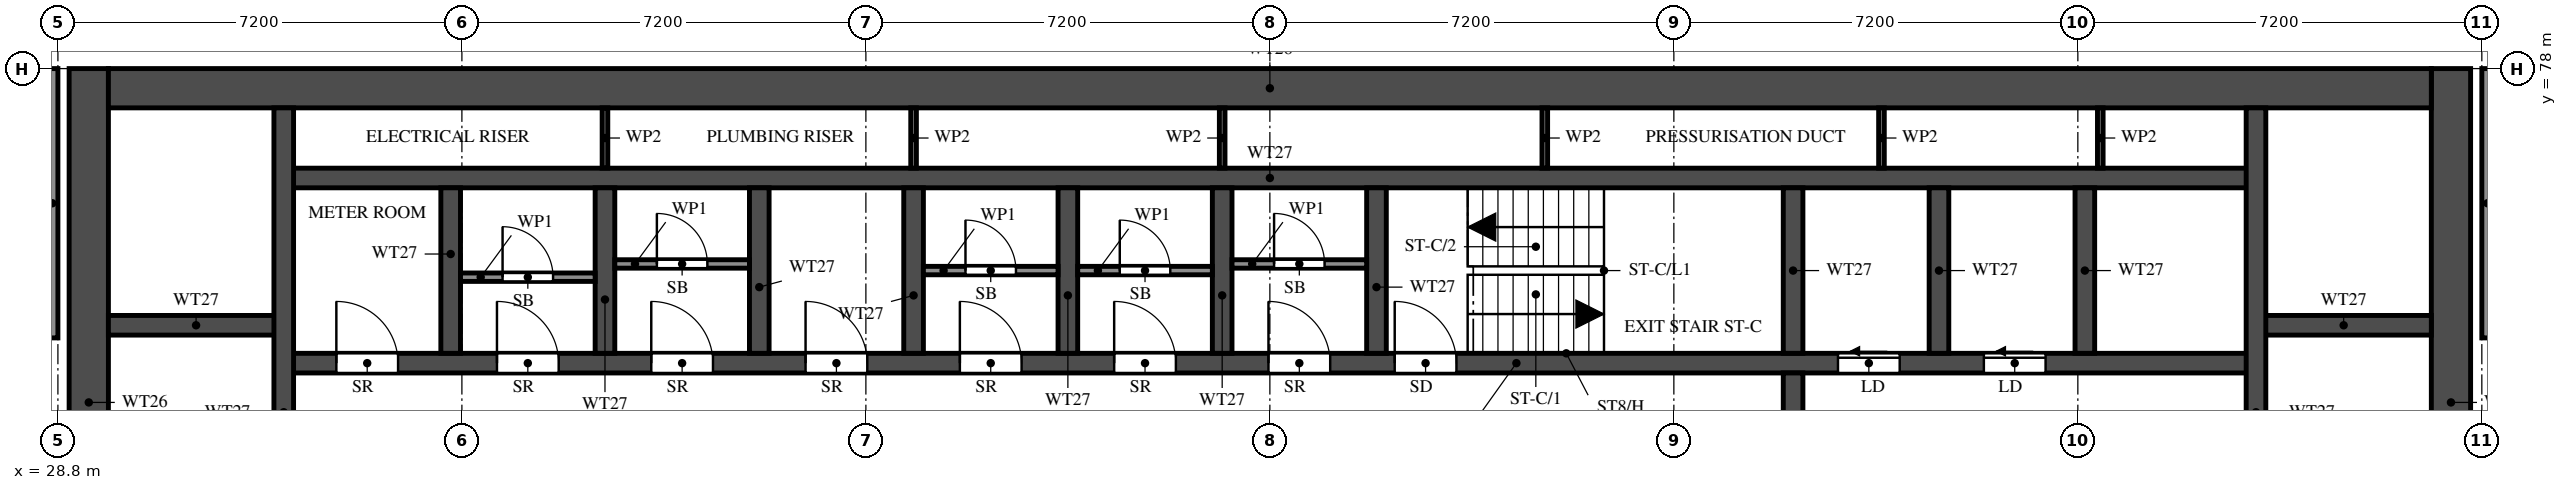
"""IFC4 building model, lengths in metres.
Left out: names, types, materials, properties, quantities, classifications, styles, units other than length and angle.
Written with IfcOpenShell. Run it as: python <this file> out.ifc"""

import sys

from ifc_helpers import new_model, si_unit, direction, frame, frame_2d, origin, place, context, subcontext, project, spatial, rectangle, extrude, element, fill, save


model = new_model("IFC4")
c1 = context("Model", 3, precision=1e-05, world=origin(), true_north=direction((0.0, 1.0)))
c2 = subcontext(c1, "Body", "Model", "MODEL_VIEW")
j1 = project(units=[si_unit("LENGTHUNIT", "METRE"), si_unit("PLANEANGLEUNIT", "RADIAN")], contexts=[c1])
p1 = place(None, origin())
s1 = spatial("IfcSite", under=j1, at=p1, CompositionType="ELEMENT")
p2 = place(p1, origin())
s2 = spatial("IfcBuilding", under=s1, at=p2, CompositionType="ELEMENT")
p3 = place(p2, frame((0.0, 0.0, 127.0)))
s3 = spatial("IfcBuildingStorey", under=s2, at=p3, CompositionType="ELEMENT", Elevation=127.0)
for number, where, z_axis, x_axis in (
    (1, (29.35, 66.1, 0.0), (0.0, 0.0, 1.0), (0.0, 1.0, 0.0)),
    (2, (71.45, 66.1, 0.0), (0.0, 0.0, 1.0), (0.0, 1.0, 0.0)),
):
    element("IfcWall", number, at=place(p3, frame(where, z_axis=z_axis, x_axis=x_axis)), inside=s3, PredefinedType="SHEAR", context=c2, shape_type="SweptSolid", body=[
        extrude(rectangle(XDim=11.9, YDim=0.7, at=frame_2d((5.95, 0.0))), origin(), (0.0, 0.0, 1.0), 3.2),
    ])
p4 = place(p3, frame((29.7, 77.65, 0.0), z_axis=(0.0, 0.0, 1.0), x_axis=(1.0, 0.0, 0.0)))
e3 = element("IfcWall", 3, at=p4, inside=s3, PredefinedType="SHEAR", context=c2, shape_type="SweptSolid", body=[
    extrude(rectangle(XDim=41.4, YDim=0.7, at=frame_2d((20.7, 0.0))), origin(), (0.0, 0.0, 1.0), 3.2),
])
p5 = place(p3, frame((32.825, 72.75, 0.0), z_axis=(0.0, 0.0, 1.0), x_axis=(1.0, 0.0, 0.0)))
e4 = element("IfcWall", 4, at=p5, inside=s3, PredefinedType="SHEAR", context=c2, shape_type="SweptSolid", body=[
    extrude(rectangle(XDim=35.15, YDim=0.35, at=frame_2d((17.575, 0.0))), origin(), (0.0, 0.0, 1.0), 3.2),
])
p6 = place(p5, frame((19.8, 0.0, 0.0)))
e5 = element("IfcOpeningElement", 5, at=p6, cuts=e4, PredefinedType="OPENING", context=c2, shape_type="SweptSolid", body=[
    extrude(rectangle(XDim=1.1, YDim=2.1, at=frame_2d((0.55, 1.05))), frame((0.0, 0.185, 0.0), z_axis=(0.0, -1.0, 0.0), x_axis=(1.0, 0.0, 0.0)), (0.0, 0.0, 1.0), 0.37),
])
p7 = place(p5, frame((27.7, 0.0, 0.0)))
e6 = element("IfcOpeningElement", 6, at=p7, cuts=e4, PredefinedType="OPENING", context=c2, shape_type="SweptSolid", body=[
    extrude(rectangle(XDim=1.1, YDim=2.1, at=frame_2d((0.55, 1.05))), frame((0.0, 0.185, 0.0), z_axis=(0.0, -1.0, 0.0), x_axis=(1.0, 0.0, 0.0)), (0.0, 0.0, 1.0), 0.37),
])
p8 = place(p5, frame((30.3, 0.0, 0.0)))
e7 = element("IfcOpeningElement", 7, at=p8, cuts=e4, PredefinedType="OPENING", context=c2, shape_type="SweptSolid", body=[
    extrude(rectangle(XDim=1.1, YDim=2.1, at=frame_2d((0.55, 1.05))), frame((0.0, 0.185, 0.0), z_axis=(0.0, -1.0, 0.0), x_axis=(1.0, 0.0, 0.0)), (0.0, 0.0, 1.0), 0.37),
])
p9 = place(p5, frame((3.8, 0.0, 0.0)))
e8 = element("IfcOpeningElement", 8, at=p9, cuts=e4, PredefinedType="OPENING", context=c2, shape_type="SweptSolid", body=[
    extrude(rectangle(XDim=1.1, YDim=2.1, at=frame_2d((0.55, 1.05))), frame((0.0, 0.185, 0.0), z_axis=(0.0, -1.0, 0.0), x_axis=(1.0, 0.0, 0.0)), (0.0, 0.0, 1.0), 0.37),
])
p10 = place(p5, frame((6.55, 0.0, 0.0)))
e9 = element("IfcOpeningElement", 9, at=p10, cuts=e4, PredefinedType="OPENING", context=c2, shape_type="SweptSolid", body=[
    extrude(rectangle(XDim=1.1, YDim=2.1, at=frame_2d((0.55, 1.05))), frame((0.0, 0.185, 0.0), z_axis=(0.0, -1.0, 0.0), x_axis=(1.0, 0.0, 0.0)), (0.0, 0.0, 1.0), 0.37),
])
p11 = place(p5, frame((9.3, 0.0, 0.0)))
e10 = element("IfcOpeningElement", 10, at=p11, cuts=e4, PredefinedType="OPENING", context=c2, shape_type="SweptSolid", body=[
    extrude(rectangle(XDim=1.1, YDim=2.1, at=frame_2d((0.55, 1.05))), frame((0.0, 0.185, 0.0), z_axis=(0.0, -1.0, 0.0), x_axis=(1.0, 0.0, 0.0)), (0.0, 0.0, 1.0), 0.37),
])
p12 = place(p5, frame((12.05, 0.0, 0.0)))
e11 = element("IfcOpeningElement", 11, at=p12, cuts=e4, PredefinedType="OPENING", context=c2, shape_type="SweptSolid", body=[
    extrude(rectangle(XDim=1.1, YDim=2.1, at=frame_2d((0.55, 1.05))), frame((0.0, 0.185, 0.0), z_axis=(0.0, -1.0, 0.0), x_axis=(1.0, 0.0, 0.0)), (0.0, 0.0, 1.0), 0.37),
])
p13 = place(p5, frame((14.8, 0.0, 0.0)))
e12 = element("IfcOpeningElement", 12, at=p13, cuts=e4, PredefinedType="OPENING", context=c2, shape_type="SweptSolid", body=[
    extrude(rectangle(XDim=1.1, YDim=2.1, at=frame_2d((0.55, 1.05))), frame((0.0, 0.185, 0.0), z_axis=(0.0, -1.0, 0.0), x_axis=(1.0, 0.0, 0.0)), (0.0, 0.0, 1.0), 0.37),
])
p14 = place(p5, frame((17.55, 0.0, 0.0)))
e13 = element("IfcOpeningElement", 13, at=p14, cuts=e4, PredefinedType="OPENING", context=c2, shape_type="SweptSolid", body=[
    extrude(rectangle(XDim=1.1, YDim=2.1, at=frame_2d((0.55, 1.05))), frame((0.0, 0.185, 0.0), z_axis=(0.0, -1.0, 0.0), x_axis=(1.0, 0.0, 0.0)), (0.0, 0.0, 1.0), 0.37),
])
p15 = place(p5, frame((0.938, 0.0, 0.0)))
e14 = element("IfcOpeningElement", 14, at=p15, cuts=e4, PredefinedType="OPENING", context=c2, shape_type="SweptSolid", body=[
    extrude(rectangle(XDim=1.1, YDim=2.1, at=frame_2d((0.55, 1.05))), frame((0.0, 0.185, 0.0), z_axis=(0.0, -1.0, 0.0), x_axis=(1.0, 0.0, 0.0)), (0.0, 0.0, 1.0), 0.37),
])
p16 = place(p3, frame((32.825, 76.05, 0.0), z_axis=(0.0, 0.0, 1.0), x_axis=(1.0, 0.0, 0.0)))
e15 = element("IfcWall", 15, at=p16, inside=s3, PredefinedType="SHEAR", context=c2, shape_type="SweptSolid", body=[
    extrude(rectangle(XDim=35.15, YDim=0.35, at=frame_2d((17.575, 0.0))), origin(), (0.0, 0.0, 1.0), 3.2),
])
for number, where, z_axis, x_axis in (
    (16, (29.7, 73.425, 0.0), (0.0, 0.0, 1.0), (1.0, 0.0, 0.0)),
    (17, (67.975, 73.425, 0.0), (0.0, 0.0, 1.0), (1.0, 0.0, 0.0)),
):
    element("IfcWall", number, at=place(p3, frame(where, z_axis=z_axis, x_axis=x_axis)), inside=s3, PredefinedType="SHEAR", context=c2, shape_type="SweptSolid", body=[
        extrude(rectangle(XDim=3.125, YDim=0.35, at=frame_2d((1.562, 0.0))), origin(), (0.0, 0.0, 1.0), 3.2),
    ])
p17 = place(p3, frame((32.825, 66.45, 0.0), z_axis=(0.0, 0.0, 1.0), x_axis=(0.0, 1.0, 0.0)))
e18 = element("IfcWall", 18, at=p17, inside=s3, PredefinedType="SHEAR", context=c2, shape_type="SweptSolid", body=[
    extrude(rectangle(XDim=10.85, YDim=0.35, at=frame_2d((5.425, 0.0))), origin(), (0.0, 0.0, 1.0), 3.2),
])
p18 = place(p3, frame((67.975, 66.45, 0.0), z_axis=(0.0, 0.0, 1.0), x_axis=(0.0, 1.0, 0.0)))
e19 = element("IfcWall", 19, at=p18, inside=s3, PredefinedType="SHEAR", context=c2, shape_type="SweptSolid", body=[
    extrude(rectangle(XDim=10.85, YDim=0.35, at=frame_2d((5.425, 0.0))), origin(), (0.0, 0.0, 1.0), 3.2),
])
p19 = place(p18, frame((0.15, 0.0, 0.0)))
e20 = element("IfcOpeningElement", 20, at=p19, cuts=e19, PredefinedType="OPENING", context=c2, shape_type="SweptSolid", body=[
    extrude(rectangle(XDim=1.1, YDim=2.1, at=frame_2d((0.55, 1.05))), frame((0.0, 0.185, 0.0), z_axis=(0.0, -1.0, 0.0), x_axis=(1.0, 0.0, 0.0)), (0.0, 0.0, 1.0), 0.37),
])
p20 = place(p3, frame((59.725, 66.45, 0.0), z_axis=(0.0, 0.0, 1.0), x_axis=(0.0, 1.0, 0.0)))
e21 = element("IfcWall", 21, at=p20, inside=s3, PredefinedType="SHEAR", context=c2, shape_type="SweptSolid", body=[
    extrude(rectangle(XDim=6.125, YDim=0.35, at=frame_2d((3.062, 0.0))), origin(), (0.0, 0.0, 1.0), 3.2),
])
p21 = place(p20, frame((3.85, 0.0, 0.0)))
e22 = element("IfcOpeningElement", 22, at=p21, cuts=e21, PredefinedType="OPENING", context=c2, shape_type="SweptSolid", body=[
    extrude(rectangle(XDim=1.2, YDim=2.1, at=frame_2d((0.6, 1.05))), frame((0.0, 0.185, 0.0), z_axis=(0.0, -1.0, 0.0), x_axis=(1.0, 0.0, 0.0)), (0.0, 0.0, 1.0), 0.37),
])
for number, where, z_axis, x_axis in (
    (23, (59.725, 72.925, 0.0), (0.0, 0.0, 1.0), (0.0, 1.0, 0.0)),
    (24, (35.8, 72.925, 0.0), (0.0, 0.0, 1.0), (0.0, 1.0, 0.0)),
    (25, (38.55, 72.925, 0.0), (0.0, 0.0, 1.0), (0.0, 1.0, 0.0)),
    (26, (41.3, 72.925, 0.0), (0.0, 0.0, 1.0), (0.0, 1.0, 0.0)),
    (27, (44.05, 72.925, 0.0), (0.0, 0.0, 1.0), (0.0, 1.0, 0.0)),
    (28, (46.8, 72.925, 0.0), (0.0, 0.0, 1.0), (0.0, 1.0, 0.0)),
    (29, (49.55, 72.925, 0.0), (0.0, 0.0, 1.0), (0.0, 1.0, 0.0)),
    (30, (52.3, 72.925, 0.0), (0.0, 0.0, 1.0), (0.0, 1.0, 0.0)),
    (31, (62.325, 72.925, 0.0), (0.0, 0.0, 1.0), (0.0, 1.0, 0.0)),
    (32, (64.925, 72.925, 0.0), (0.0, 0.0, 1.0), (0.0, 1.0, 0.0)),
):
    element("IfcWall", number, at=place(p3, frame(where, z_axis=z_axis, x_axis=x_axis)), inside=s3, PredefinedType="SHEAR", context=c2, shape_type="SweptSolid", body=[
        extrude(rectangle(XDim=2.95, YDim=0.35, at=frame_2d((1.475, 0.0))), origin(), (0.0, 0.0, 1.0), 3.2),
    ])
p22 = place(p3, frame((35.975, 74.282, 0.0), z_axis=(0.0, 0.0, 1.0), x_axis=(1.0, 0.0, 0.0)))
e33 = element("IfcWall", 33, at=p22, inside=s3, PredefinedType="PARTITIONING", context=c2, shape_type="SweptSolid", body=[
    extrude(rectangle(XDim=2.4, YDim=0.15, at=frame_2d((1.2, 0.0))), origin(), (0.0, 0.0, 1.0), 3.2),
])
p23 = place(p22, frame((0.75, 0.0, 0.0)))
e34 = element("IfcOpeningElement", 34, at=p23, cuts=e33, PredefinedType="OPENING", context=c2, shape_type="SweptSolid", body=[
    extrude(rectangle(XDim=0.9, YDim=2.1, at=frame_2d((0.45, 1.05))), frame((0.0, 0.085, 0.0), z_axis=(0.0, -1.0, 0.0), x_axis=(1.0, 0.0, 0.0)), (0.0, 0.0, 1.0), 0.17),
])
p24 = place(p3, frame((38.725, 74.518, 0.0), z_axis=(0.0, 0.0, 1.0), x_axis=(1.0, 0.0, 0.0)))
e35 = element("IfcWall", 35, at=p24, inside=s3, PredefinedType="PARTITIONING", context=c2, shape_type="SweptSolid", body=[
    extrude(rectangle(XDim=2.4, YDim=0.15, at=frame_2d((1.2, 0.0))), origin(), (0.0, 0.0, 1.0), 3.2),
])
p25 = place(p24, frame((0.75, 0.0, 0.0)))
e36 = element("IfcOpeningElement", 36, at=p25, cuts=e35, PredefinedType="OPENING", context=c2, shape_type="SweptSolid", body=[
    extrude(rectangle(XDim=0.9, YDim=2.1, at=frame_2d((0.45, 1.05))), frame((0.0, 0.085, 0.0), z_axis=(0.0, -1.0, 0.0), x_axis=(1.0, 0.0, 0.0)), (0.0, 0.0, 1.0), 0.17),
])
p26 = place(p3, frame((44.225, 74.4, 0.0), z_axis=(0.0, 0.0, 1.0), x_axis=(1.0, 0.0, 0.0)))
e37 = element("IfcWall", 37, at=p26, inside=s3, PredefinedType="PARTITIONING", context=c2, shape_type="SweptSolid", body=[
    extrude(rectangle(XDim=2.4, YDim=0.15, at=frame_2d((1.2, 0.0))), origin(), (0.0, 0.0, 1.0), 3.2),
])
p27 = place(p26, frame((0.75, 0.0, 0.0)))
e38 = element("IfcOpeningElement", 38, at=p27, cuts=e37, PredefinedType="OPENING", context=c2, shape_type="SweptSolid", body=[
    extrude(rectangle(XDim=0.9, YDim=2.1, at=frame_2d((0.45, 1.05))), frame((0.0, 0.085, 0.0), z_axis=(0.0, -1.0, 0.0), x_axis=(1.0, 0.0, 0.0)), (0.0, 0.0, 1.0), 0.17),
])
p28 = place(p3, frame((46.975, 74.4, 0.0), z_axis=(0.0, 0.0, 1.0), x_axis=(1.0, 0.0, 0.0)))
e39 = element("IfcWall", 39, at=p28, inside=s3, PredefinedType="PARTITIONING", context=c2, shape_type="SweptSolid", body=[
    extrude(rectangle(XDim=2.4, YDim=0.15, at=frame_2d((1.2, 0.0))), origin(), (0.0, 0.0, 1.0), 3.2),
])
p29 = place(p28, frame((0.75, 0.0, 0.0)))
e40 = element("IfcOpeningElement", 40, at=p29, cuts=e39, PredefinedType="OPENING", context=c2, shape_type="SweptSolid", body=[
    extrude(rectangle(XDim=0.9, YDim=2.1, at=frame_2d((0.45, 1.05))), frame((0.0, 0.085, 0.0), z_axis=(0.0, -1.0, 0.0), x_axis=(1.0, 0.0, 0.0)), (0.0, 0.0, 1.0), 0.17),
])
p30 = place(p3, frame((49.725, 74.518, 0.0), z_axis=(0.0, 0.0, 1.0), x_axis=(1.0, 0.0, 0.0)))
e41 = element("IfcWall", 41, at=p30, inside=s3, PredefinedType="PARTITIONING", context=c2, shape_type="SweptSolid", body=[
    extrude(rectangle(XDim=2.4, YDim=0.15, at=frame_2d((1.2, 0.0))), origin(), (0.0, 0.0, 1.0), 3.2),
])
p31 = place(p30, frame((0.75, 0.0, 0.0)))
e42 = element("IfcOpeningElement", 42, at=p31, cuts=e41, PredefinedType="OPENING", context=c2, shape_type="SweptSolid", body=[
    extrude(rectangle(XDim=0.9, YDim=2.1, at=frame_2d((0.45, 1.05))), frame((0.0, 0.085, 0.0), z_axis=(0.0, -1.0, 0.0), x_axis=(1.0, 0.0, 0.0)), (0.0, 0.0, 1.0), 0.17),
])
for number, where, z_axis, x_axis in (
    (43, (38.55, 76.225, 0.0), (0.0, 0.0, 1.0), (0.0, 1.0, 0.0)),
    (44, (44.05, 76.225, 0.0), (0.0, 0.0, 1.0), (0.0, 1.0, 0.0)),
    (45, (49.55, 76.225, 0.0), (0.0, 0.0, 1.0), (0.0, 1.0, 0.0)),
    (46, (55.3, 76.225, 0.0), (0.0, 0.0, 1.0), (0.0, 1.0, 0.0)),
    (47, (61.3, 76.225, 0.0), (0.0, 0.0, 1.0), (0.0, 1.0, 0.0)),
    (48, (65.2, 76.225, 0.0), (0.0, 0.0, 1.0), (0.0, 1.0, 0.0)),
):
    element("IfcWall", number, at=place(p3, frame(where, z_axis=z_axis, x_axis=x_axis)), inside=s3, PredefinedType="PARTITIONING", context=c2, shape_type="SweptSolid", body=[
        extrude(rectangle(XDim=1.075, YDim=0.1, at=frame_2d((0.538, 0.0))), origin(), (0.0, 0.0, 1.0), 3.2),
    ])
for number, where, z_axis, x_axis in (
    (49, (28.7, 73.2, 0.0), (0.0, 0.0, 1.0), (0.0, 1.0, 0.0)),
    (50, (72.1, 73.2, 0.0), (0.0, 0.0, 1.0), (0.0, 1.0, 0.0)),
):
    element("IfcWall", number, at=place(p3, frame(where, z_axis=z_axis, x_axis=x_axis)), inside=s3, PredefinedType="SOLIDWALL", context=c2, shape_type="SweptSolid", body=[
        extrude(rectangle(XDim=4.8, YDim=0.2, at=frame_2d((2.4, 0.0))), origin(), (0.0, 0.0, 1.0), 3.2),
    ])
p32 = place(p6, origin())
e51 = element("IfcDoor", 51, at=p32, inside=s3, OperationType="SINGLE_SWING_LEFT", PredefinedType="DOOR", context=c2, shape_type="SweptSolid", body=[
    extrude(rectangle(XDim=1.1, YDim=2.1, at=frame_2d((0.55, 1.05))), frame((0.0, 0.025, 0.0), z_axis=(0.0, -1.0, 0.0), x_axis=(1.0, 0.0, 0.0)), (0.0, 0.0, 1.0), 0.05),
])
fill(e5, e51)
p33 = place(p7, origin())
e52 = element("IfcDoor", 52, at=p33, inside=s3, OperationType="SLIDING_TO_LEFT", PredefinedType="DOOR", context=c2, shape_type="SweptSolid", body=[
    extrude(rectangle(XDim=1.1, YDim=2.1, at=frame_2d((0.55, 1.05))), frame((0.0, 0.025, 0.0), z_axis=(0.0, -1.0, 0.0), x_axis=(1.0, 0.0, 0.0)), (0.0, 0.0, 1.0), 0.05),
])
fill(e6, e52)
p34 = place(p8, origin())
e53 = element("IfcDoor", 53, at=p34, inside=s3, OperationType="SLIDING_TO_LEFT", PredefinedType="DOOR", context=c2, shape_type="SweptSolid", body=[
    extrude(rectangle(XDim=1.1, YDim=2.1, at=frame_2d((0.55, 1.05))), frame((0.0, 0.025, 0.0), z_axis=(0.0, -1.0, 0.0), x_axis=(1.0, 0.0, 0.0)), (0.0, 0.0, 1.0), 0.05),
])
fill(e7, e53)
p35 = place(p9, origin())
e54 = element("IfcDoor", 54, at=p35, inside=s3, OperationType="SINGLE_SWING_LEFT", PredefinedType="DOOR", context=c2, shape_type="SweptSolid", body=[
    extrude(rectangle(XDim=1.1, YDim=2.1, at=frame_2d((0.55, 1.05))), frame((0.0, 0.025, 0.0), z_axis=(0.0, -1.0, 0.0), x_axis=(1.0, 0.0, 0.0)), (0.0, 0.0, 1.0), 0.05),
])
fill(e8, e54)
p36 = place(p23, origin())
e55 = element("IfcDoor", 55, at=p36, inside=s3, OperationType="SINGLE_SWING_LEFT", PredefinedType="DOOR", context=c2, shape_type="SweptSolid", body=[
    extrude(rectangle(XDim=0.9, YDim=2.1, at=frame_2d((0.45, 1.05))), frame((0.0, 0.025, 0.0), z_axis=(0.0, -1.0, 0.0), x_axis=(1.0, 0.0, 0.0)), (0.0, 0.0, 1.0), 0.05),
])
fill(e34, e55)
p37 = place(p10, origin())
e56 = element("IfcDoor", 56, at=p37, inside=s3, OperationType="SINGLE_SWING_RIGHT", PredefinedType="DOOR", context=c2, shape_type="SweptSolid", body=[
    extrude(rectangle(XDim=1.1, YDim=2.1, at=frame_2d((0.55, 1.05))), frame((0.0, 0.025, 0.0), z_axis=(0.0, -1.0, 0.0), x_axis=(1.0, 0.0, 0.0)), (0.0, 0.0, 1.0), 0.05),
])
fill(e9, e56)
p38 = place(p25, origin())
e57 = element("IfcDoor", 57, at=p38, inside=s3, OperationType="SINGLE_SWING_LEFT", PredefinedType="DOOR", context=c2, shape_type="SweptSolid", body=[
    extrude(rectangle(XDim=0.9, YDim=2.1, at=frame_2d((0.45, 1.05))), frame((0.0, 0.025, 0.0), z_axis=(0.0, -1.0, 0.0), x_axis=(1.0, 0.0, 0.0)), (0.0, 0.0, 1.0), 0.05),
])
fill(e36, e57)
p39 = place(p11, origin())
e58 = element("IfcDoor", 58, at=p39, inside=s3, OperationType="SINGLE_SWING_LEFT", PredefinedType="DOOR", context=c2, shape_type="SweptSolid", body=[
    extrude(rectangle(XDim=1.1, YDim=2.1, at=frame_2d((0.55, 1.05))), frame((0.0, 0.025, 0.0), z_axis=(0.0, -1.0, 0.0), x_axis=(1.0, 0.0, 0.0)), (0.0, 0.0, 1.0), 0.05),
])
fill(e10, e58)
p40 = place(p12, origin())
e59 = element("IfcDoor", 59, at=p40, inside=s3, OperationType="SINGLE_SWING_RIGHT", PredefinedType="DOOR", context=c2, shape_type="SweptSolid", body=[
    extrude(rectangle(XDim=1.1, YDim=2.1, at=frame_2d((0.55, 1.05))), frame((0.0, 0.025, 0.0), z_axis=(0.0, -1.0, 0.0), x_axis=(1.0, 0.0, 0.0)), (0.0, 0.0, 1.0), 0.05),
])
fill(e11, e59)
p41 = place(p27, origin())
e60 = element("IfcDoor", 60, at=p41, inside=s3, OperationType="SINGLE_SWING_RIGHT", PredefinedType="DOOR", context=c2, shape_type="SweptSolid", body=[
    extrude(rectangle(XDim=0.9, YDim=2.1, at=frame_2d((0.45, 1.05))), frame((0.0, 0.025, 0.0), z_axis=(0.0, -1.0, 0.0), x_axis=(1.0, 0.0, 0.0)), (0.0, 0.0, 1.0), 0.05),
])
fill(e38, e60)
p42 = place(p13, origin())
e61 = element("IfcDoor", 61, at=p42, inside=s3, OperationType="SINGLE_SWING_LEFT", PredefinedType="DOOR", context=c2, shape_type="SweptSolid", body=[
    extrude(rectangle(XDim=1.1, YDim=2.1, at=frame_2d((0.55, 1.05))), frame((0.0, 0.025, 0.0), z_axis=(0.0, -1.0, 0.0), x_axis=(1.0, 0.0, 0.0)), (0.0, 0.0, 1.0), 0.05),
])
fill(e12, e61)
p43 = place(p29, origin())
e62 = element("IfcDoor", 62, at=p43, inside=s3, OperationType="SINGLE_SWING_LEFT", PredefinedType="DOOR", context=c2, shape_type="SweptSolid", body=[
    extrude(rectangle(XDim=0.9, YDim=2.1, at=frame_2d((0.45, 1.05))), frame((0.0, 0.025, 0.0), z_axis=(0.0, -1.0, 0.0), x_axis=(1.0, 0.0, 0.0)), (0.0, 0.0, 1.0), 0.05),
])
fill(e40, e62)
p44 = place(p14, origin())
e63 = element("IfcDoor", 63, at=p44, inside=s3, OperationType="SINGLE_SWING_RIGHT", PredefinedType="DOOR", context=c2, shape_type="SweptSolid", body=[
    extrude(rectangle(XDim=1.1, YDim=2.1, at=frame_2d((0.55, 1.05))), frame((0.0, 0.025, 0.0), z_axis=(0.0, -1.0, 0.0), x_axis=(1.0, 0.0, 0.0)), (0.0, 0.0, 1.0), 0.05),
])
fill(e13, e63)
p45 = place(p31, origin())
e64 = element("IfcDoor", 64, at=p45, inside=s3, OperationType="SINGLE_SWING_LEFT", PredefinedType="DOOR", context=c2, shape_type="SweptSolid", body=[
    extrude(rectangle(XDim=0.9, YDim=2.1, at=frame_2d((0.45, 1.05))), frame((0.0, 0.025, 0.0), z_axis=(0.0, -1.0, 0.0), x_axis=(1.0, 0.0, 0.0)), (0.0, 0.0, 1.0), 0.05),
])
fill(e42, e64)
p46 = place(p15, origin())
e65 = element("IfcDoor", 65, at=p46, inside=s3, OperationType="SINGLE_SWING_LEFT", PredefinedType="DOOR", context=c2, shape_type="SweptSolid", body=[
    extrude(rectangle(XDim=1.1, YDim=2.1, at=frame_2d((0.55, 1.05))), frame((0.0, 0.025, 0.0), z_axis=(0.0, -1.0, 0.0), x_axis=(1.0, 0.0, 0.0)), (0.0, 0.0, 1.0), 0.05),
])
fill(e14, e65)
save(model, sys.argv[1])
